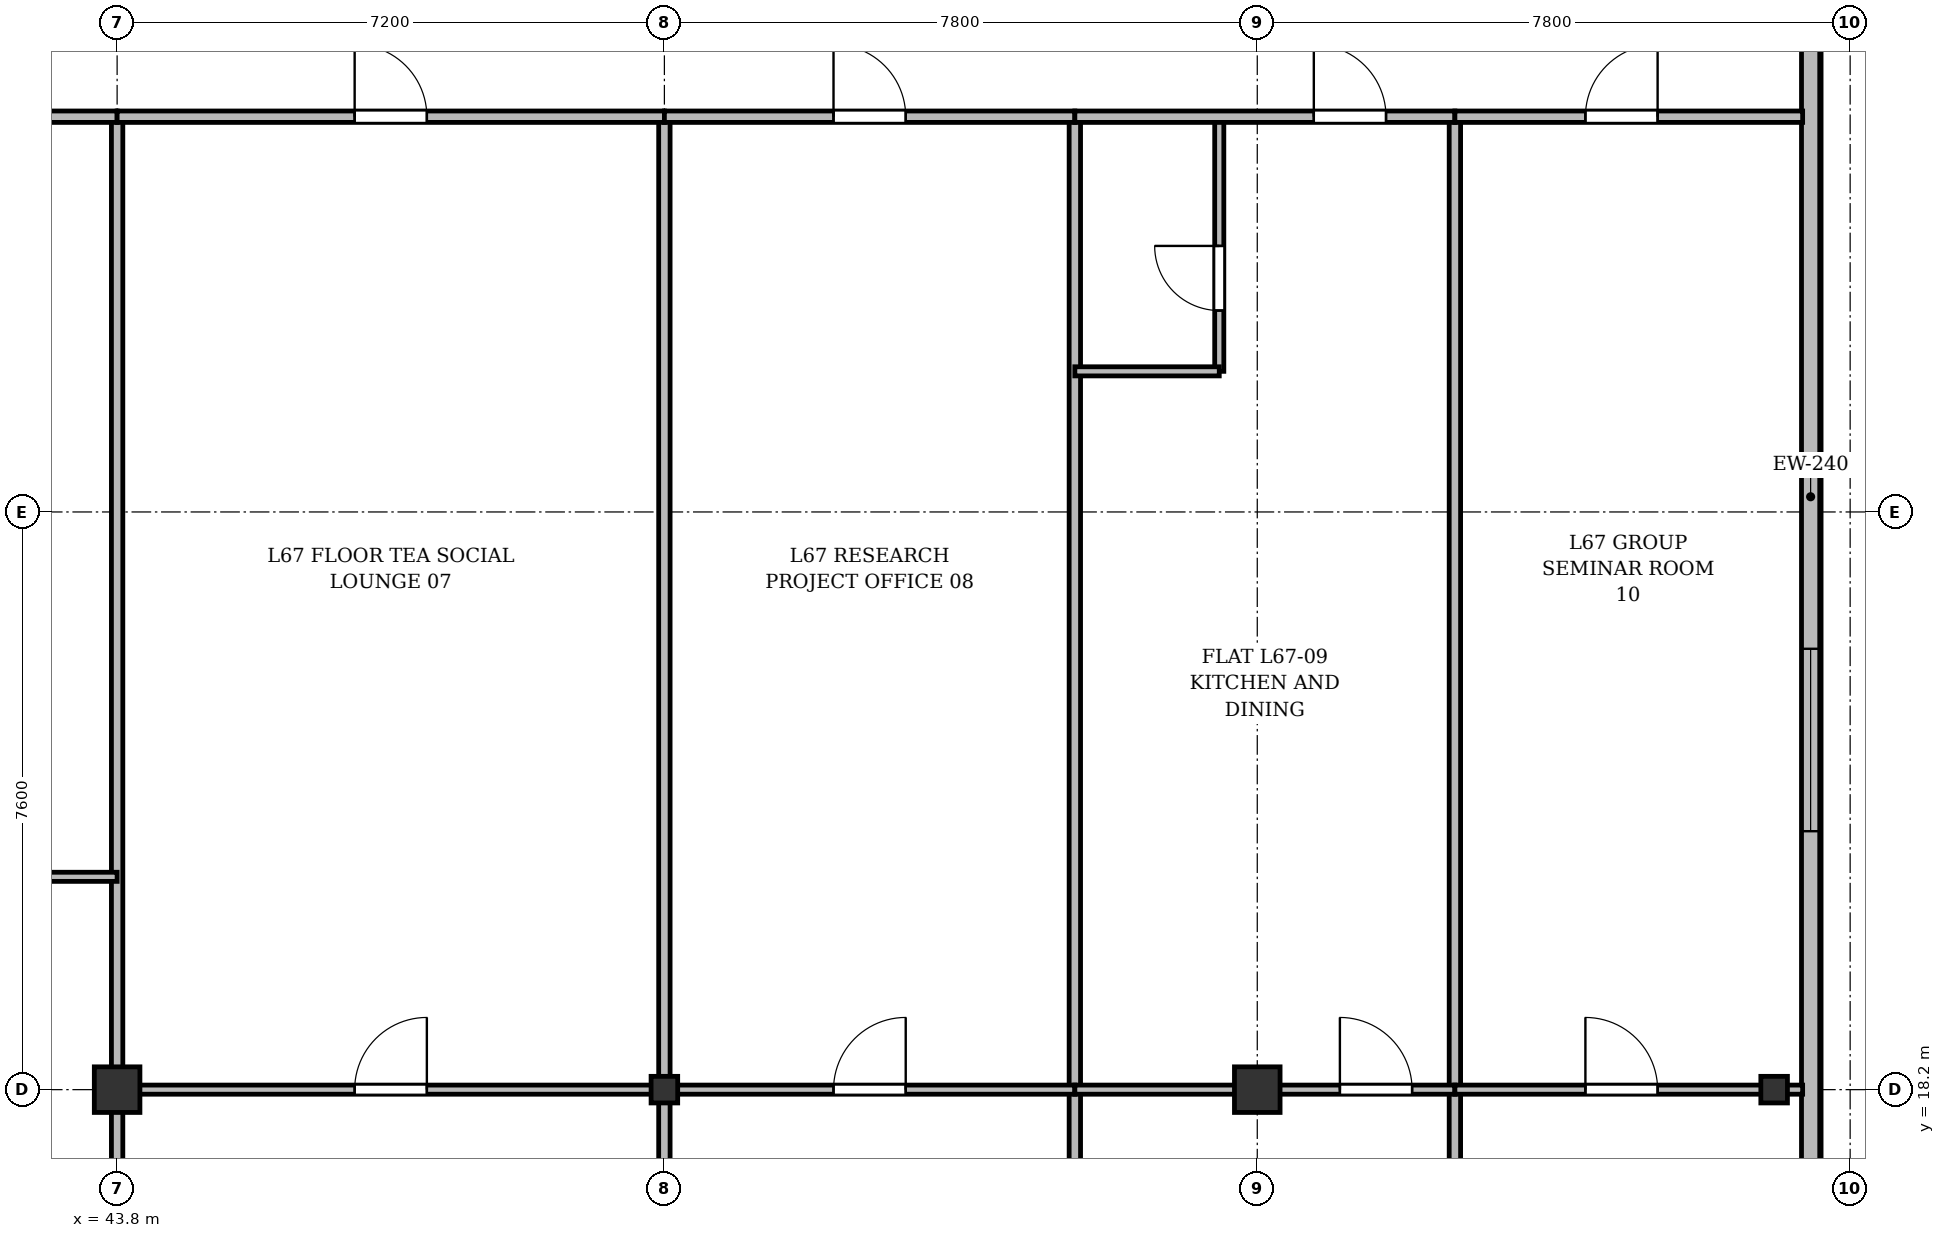
"""IFC4 building model, lengths in metres.
Left out: names, types, materials, properties, quantities, classifications, styles, units other than length and angle.
Written with IfcOpenShell. Run it as: python <this file> out.ifc"""

import sys

from ifc_helpers import new_model, si_unit, direction, frame, frame_2d, origin, origin_2d, place, context, subcontext, project, spatial, rectangle, i_section, extrude, source, transform, mapped, element, fill, save


model = new_model("IFC4")
c1 = context("Model", 3, precision=1e-05, world=origin(), true_north=direction((0.0, 1.0)))
c2 = subcontext(c1, "Body", "Model", "MODEL_VIEW")
j1 = project(units=[si_unit("LENGTHUNIT", "METRE"), si_unit("PLANEANGLEUNIT", "RADIAN")], contexts=[c1])
p1 = place(None, origin())
s1 = spatial("IfcSite", under=j1, at=p1, CompositionType="ELEMENT")
p2 = place(p1, origin())
s2 = spatial("IfcBuilding", under=s1, at=p2, CompositionType="ELEMENT")
p3 = place(p2, frame((0.0, 0.0, 259.5)))
s3 = spatial("IfcBuildingStorey", under=s2, at=p3, CompositionType="ELEMENT", Elevation=259.5)
m1 = source(origin(), c2, "Body", "SweptSolid", [
    extrude(rectangle(XDim=0.6, YDim=0.6, at=origin_2d()), origin(), (0.0, 0.0, 1.0), 3.6),
])
p4 = place(p3, frame((43.8, 18.2, 0.0), z_axis=(0.0, 0.0, 1.0), x_axis=(1.0, 0.0, 0.0)))
e1 = element("IfcColumn", 1, at=p4, inside=s3, PredefinedType="COLUMN", context=c2, shape_type="MappedRepresentation", body=[
    mapped(m1, transform((0.0, 0.0, 0.0), x_axis=(1.0, 0.0, 0.0), y_axis=(0.0, 1.0, 0.0), z_axis=(0.0, 0.0, 1.0), scale=1.0)),
])
m2 = source(origin(), c2, "Body", "SweptSolid", [
    extrude(i_section(OverallWidth=0.35, OverallDepth=0.35, WebThickness=0.018, FlangeThickness=0.028, at=origin_2d()), origin(), (0.0, 0.0, 1.0), 3.6),
])
p5 = place(p3, frame((51.0, 18.2, 0.0), z_axis=(0.0, 0.0, 1.0), x_axis=(1.0, 0.0, 0.0)))
e2 = element("IfcColumn", 2, at=p5, inside=s3, PredefinedType="COLUMN", context=c2, shape_type="MappedRepresentation", body=[
    mapped(m2, transform((0.0, 0.0, 0.0), x_axis=(1.0, 0.0, 0.0), y_axis=(0.0, 1.0, 0.0), z_axis=(0.0, 0.0, 1.0), scale=1.0)),
])
p6 = place(p3, frame((58.8, 18.2, 0.0), z_axis=(0.0, 0.0, 1.0), x_axis=(1.0, 0.0, 0.0)))
e3 = element("IfcColumn", 3, at=p6, inside=s3, PredefinedType="COLUMN", context=c2, shape_type="MappedRepresentation", body=[
    mapped(m1, transform((0.0, 0.0, 0.0), x_axis=(1.0, 0.0, 0.0), y_axis=(0.0, 1.0, 0.0), z_axis=(0.0, 0.0, 1.0), scale=1.0)),
])
p7 = place(p3, frame((65.6, 18.2, 0.0), z_axis=(0.0, 0.0, 1.0), x_axis=(1.0, 0.0, 0.0)))
e4 = element("IfcColumn", 4, at=p7, inside=s3, PredefinedType="COLUMN", context=c2, shape_type="MappedRepresentation", body=[
    mapped(m2, transform((0.0, 0.0, 0.0), x_axis=(1.0, 0.0, 0.0), y_axis=(0.0, 1.0, 0.0), z_axis=(0.0, 0.0, 1.0), scale=1.0)),
])
p8 = place(p3, frame((66.08, 45.5, 0.0), z_axis=(0.0, 0.0, 1.0), x_axis=(0.0, -1.0, 0.0)))
e5 = element("IfcWall", 5, at=p8, inside=s3, PredefinedType="SOLIDWALL", context=c2, shape_type="SweptSolid", body=[
    extrude(rectangle(XDim=39.0, YDim=0.24, at=frame_2d((19.5, 0.0))), origin(), (0.0, 0.0, 1.0), 3.37),
])
p9 = place(p8, frame((36.35, 0.0, 0.92)))
e6 = element("IfcOpeningElement", 6, at=p9, cuts=e5, PredefinedType="OPENING", context=c2, shape_type="SweptSolid", body=[
    extrude(rectangle(XDim=1.2, YDim=1.65, at=frame_2d((0.6, 0.825))), frame((0.0, 0.13, 0.0), z_axis=(0.0, -1.0, 0.0), x_axis=(1.0, 0.0, 0.0)), (0.0, 0.0, 1.0), 0.26),
])
p10 = place(p8, frame((32.9, 0.0, 0.92)))
e7 = element("IfcOpeningElement", 7, at=p10, cuts=e5, PredefinedType="OPENING", context=c2, shape_type="SweptSolid", body=[
    extrude(rectangle(XDim=2.4, YDim=2.1, at=frame_2d((1.2, 1.05))), frame((0.0, 0.13, 0.0), z_axis=(0.0, -1.0, 0.0), x_axis=(1.0, 0.0, 0.0)), (0.0, 0.0, 1.0), 0.26),
])
p11 = place(p8, frame((28.7, 0.0, 0.92)))
e8 = element("IfcOpeningElement", 8, at=p11, cuts=e5, PredefinedType="OPENING", context=c2, shape_type="SweptSolid", body=[
    extrude(rectangle(XDim=2.4, YDim=2.1, at=frame_2d((1.2, 1.05))), frame((0.0, 0.13, 0.0), z_axis=(0.0, -1.0, 0.0), x_axis=(1.0, 0.0, 0.0)), (0.0, 0.0, 1.0), 0.26),
])
p12 = place(p8, frame((21.5, 0.0, 0.92)))
e9 = element("IfcOpeningElement", 9, at=p12, cuts=e5, PredefinedType="OPENING", context=c2, shape_type="SweptSolid", body=[
    extrude(rectangle(XDim=2.4, YDim=2.1, at=frame_2d((1.2, 1.05))), frame((0.0, 0.13, 0.0), z_axis=(0.0, -1.0, 0.0), x_axis=(1.0, 0.0, 0.0)), (0.0, 0.0, 1.0), 0.26),
])
p13 = place(p8, frame((7.5, 0.0, 0.92)))
e10 = element("IfcOpeningElement", 10, at=p13, cuts=e5, PredefinedType="OPENING", context=c2, shape_type="SweptSolid", body=[
    extrude(rectangle(XDim=2.4, YDim=2.1, at=frame_2d((1.2, 1.05))), frame((0.0, 0.13, 0.0), z_axis=(0.0, -1.0, 0.0), x_axis=(1.0, 0.0, 0.0)), (0.0, 0.0, 1.0), 0.26),
])
p14 = place(p8, frame((4.5, 0.0, 0.92)))
e11 = element("IfcOpeningElement", 11, at=p14, cuts=e5, PredefinedType="OPENING", context=c2, shape_type="SweptSolid", body=[
    extrude(rectangle(XDim=1.2, YDim=1.65, at=frame_2d((0.6, 0.825))), frame((0.0, 0.13, 0.0), z_axis=(0.0, -1.0, 0.0), x_axis=(1.0, 0.0, 0.0)), (0.0, 0.0, 1.0), 0.26),
])
p15 = place(p8, frame((1.15, 0.0, 0.92)))
e12 = element("IfcOpeningElement", 12, at=p15, cuts=e5, PredefinedType="OPENING", context=c2, shape_type="SweptSolid", body=[
    extrude(rectangle(XDim=1.2, YDim=1.65, at=frame_2d((0.6, 0.825))), frame((0.0, 0.13, 0.0), z_axis=(0.0, -1.0, 0.0), x_axis=(1.0, 0.0, 0.0)), (0.0, 0.0, 1.0), 0.26),
])
for number, where, z_axis, x_axis in (
    (13, (43.8, 3.725, 0.0), (0.0, 0.0, 1.0), (0.0, 1.0, 0.0)),
    (14, (51.0, 3.725, 0.0), (0.0, 0.0, 1.0), (0.0, 1.0, 0.0)),
):
    element("IfcWall", number, at=place(p3, frame(where, z_axis=z_axis, x_axis=x_axis)), inside=s3, PredefinedType="PARTITIONING", context=c2, shape_type="SweptSolid", body=[
        extrude(rectangle(XDim=27.275, YDim=0.15, at=frame_2d((13.637, 0.0))), origin(), (0.0, 0.0, 1.0), 2.87),
    ])
for number, where, z_axis, x_axis in (
    (15, (56.4, 3.725, 0.0), (0.0, 0.0, 1.0), (0.0, 1.0, 0.0)),
    (16, (61.4, 3.725, 0.0), (0.0, 0.0, 1.0), (0.0, 1.0, 0.0)),
):
    element("IfcWall", number, at=place(p3, frame(where, z_axis=z_axis, x_axis=x_axis)), inside=s3, PredefinedType="PARTITIONING", context=c2, shape_type="SweptSolid", body=[
        extrude(rectangle(XDim=27.275, YDim=0.15, at=frame_2d((13.637, 0.0))), origin(), (0.0, 0.0, 1.0), 2.92),
    ])
p16 = place(p3, frame((36.4, 21.0, 0.0), z_axis=(0.0, 0.0, 1.0), x_axis=(1.0, 0.0, 0.0)))
e17 = element("IfcWall", 17, at=p16, inside=s3, PredefinedType="PARTITIONING", context=c2, shape_type="SweptSolid", body=[
    extrude(rectangle(XDim=7.4, YDim=0.12, at=frame_2d((3.7, 0.0))), origin(), (0.0, 0.0, 1.0), 2.87),
])
p17 = place(p16, frame((3.133, 0.0, 0.0)))
e18 = element("IfcOpeningElement", 18, at=p17, cuts=e17, PredefinedType="OPENING", context=c2, shape_type="SweptSolid", body=[
    extrude(rectangle(XDim=0.95, YDim=2.15, at=frame_2d((0.475, 1.075))), frame((0.0, 0.07, 0.0), z_axis=(0.0, -1.0, 0.0), x_axis=(1.0, 0.0, 0.0)), (0.0, 0.0, 1.0), 0.14),
])
p18 = place(p3, frame((36.4, 31.0, 0.0), z_axis=(0.0, 0.0, 1.0), x_axis=(1.0, 0.0, 0.0)))
e19 = element("IfcWall", 19, at=p18, inside=s3, PredefinedType="PARTITIONING", context=c2, shape_type="SweptSolid", body=[
    extrude(rectangle(XDim=7.4, YDim=0.15, at=frame_2d((3.7, 0.0))), origin(), (0.0, 0.0, 1.0), 2.87),
])
p19 = place(p18, frame((4.967, 0.0, 0.0)))
e20 = element("IfcOpeningElement", 20, at=p19, cuts=e19, PredefinedType="OPENING", context=c2, shape_type="SweptSolid", body=[
    extrude(rectangle(XDim=0.95, YDim=2.15, at=frame_2d((0.475, 1.075))), frame((0.0, 0.085, 0.0), z_axis=(0.0, -1.0, 0.0), x_axis=(1.0, 0.0, 0.0)), (0.0, 0.0, 1.0), 0.17),
])
p20 = place(p3, frame((43.8, 31.0, 0.0), z_axis=(0.0, 0.0, 1.0), x_axis=(1.0, 0.0, 0.0)))
e21 = element("IfcWall", 21, at=p20, inside=s3, PredefinedType="PARTITIONING", context=c2, shape_type="SweptSolid", body=[
    extrude(rectangle(XDim=7.2, YDim=0.15, at=frame_2d((3.6, 0.0))), origin(), (0.0, 0.0, 1.0), 2.87),
])
p21 = place(p20, frame((3.125, 0.0, 0.0)))
e22 = element("IfcOpeningElement", 22, at=p21, cuts=e21, PredefinedType="OPENING", context=c2, shape_type="SweptSolid", body=[
    extrude(rectangle(XDim=0.95, YDim=2.15, at=frame_2d((0.475, 1.075))), frame((0.0, 0.085, 0.0), z_axis=(0.0, -1.0, 0.0), x_axis=(1.0, 0.0, 0.0)), (0.0, 0.0, 1.0), 0.17),
])
p22 = place(p3, frame((43.8, 18.2, 0.0), z_axis=(0.0, 0.0, 1.0), x_axis=(1.0, 0.0, 0.0)))
e23 = element("IfcWall", 23, at=p22, inside=s3, PredefinedType="PARTITIONING", context=c2, shape_type="SweptSolid", body=[
    extrude(rectangle(XDim=7.2, YDim=0.12, at=frame_2d((3.6, 0.0))), origin(), (0.0, 0.0, 1.0), 2.92),
])
p23 = place(p22, frame((3.125, 0.0, 0.0)))
e24 = element("IfcOpeningElement", 24, at=p23, cuts=e23, PredefinedType="OPENING", context=c2, shape_type="SweptSolid", body=[
    extrude(rectangle(XDim=0.95, YDim=2.15, at=frame_2d((0.475, 1.075))), frame((0.0, 0.07, 0.0), z_axis=(0.0, -1.0, 0.0), x_axis=(1.0, 0.0, 0.0)), (0.0, 0.0, 1.0), 0.14),
])
p24 = place(p3, frame((51.0, 31.0, 0.0), z_axis=(0.0, 0.0, 1.0), x_axis=(1.0, 0.0, 0.0)))
e25 = element("IfcWall", 25, at=p24, inside=s3, PredefinedType="PARTITIONING", context=c2, shape_type="SweptSolid", body=[
    extrude(rectangle(XDim=5.4, YDim=0.15, at=frame_2d((2.7, 0.0))), origin(), (0.0, 0.0, 1.0), 2.87),
])
p25 = place(p24, frame((2.225, 0.0, 0.0)))
e26 = element("IfcOpeningElement", 26, at=p25, cuts=e25, PredefinedType="OPENING", context=c2, shape_type="SweptSolid", body=[
    extrude(rectangle(XDim=0.95, YDim=2.15, at=frame_2d((0.475, 1.075))), frame((0.0, 0.085, 0.0), z_axis=(0.0, -1.0, 0.0), x_axis=(1.0, 0.0, 0.0)), (0.0, 0.0, 1.0), 0.17),
])
p26 = place(p3, frame((51.0, 18.2, 0.0), z_axis=(0.0, 0.0, 1.0), x_axis=(1.0, 0.0, 0.0)))
e27 = element("IfcWall", 27, at=p26, inside=s3, PredefinedType="PARTITIONING", context=c2, shape_type="SweptSolid", body=[
    extrude(rectangle(XDim=5.4, YDim=0.12, at=frame_2d((2.7, 0.0))), origin(), (0.0, 0.0, 1.0), 2.92),
])
p27 = place(p26, frame((2.225, 0.0, 0.0)))
e28 = element("IfcOpeningElement", 28, at=p27, cuts=e27, PredefinedType="OPENING", context=c2, shape_type="SweptSolid", body=[
    extrude(rectangle(XDim=0.95, YDim=2.15, at=frame_2d((0.475, 1.075))), frame((0.0, 0.07, 0.0), z_axis=(0.0, -1.0, 0.0), x_axis=(1.0, 0.0, 0.0)), (0.0, 0.0, 1.0), 0.14),
])
p28 = place(p3, frame((56.4, 18.2, 0.0), z_axis=(0.0, 0.0, 1.0), x_axis=(1.0, 0.0, 0.0)))
e29 = element("IfcWall", 29, at=p28, inside=s3, PredefinedType="PARTITIONING", context=c2, shape_type="SweptSolid", body=[
    extrude(rectangle(XDim=5.0, YDim=0.12, at=frame_2d((2.5, 0.0))), origin(), (0.0, 0.0, 1.0), 2.92),
])
p29 = place(p28, frame((3.487, 0.0, 0.0)))
e30 = element("IfcOpeningElement", 30, at=p29, cuts=e29, PredefinedType="OPENING", context=c2, shape_type="SweptSolid", body=[
    extrude(rectangle(XDim=0.95, YDim=2.15, at=frame_2d((0.475, 1.075))), frame((0.0, 0.07, 0.0), z_axis=(0.0, -1.0, 0.0), x_axis=(1.0, 0.0, 0.0)), (0.0, 0.0, 1.0), 0.14),
])
p30 = place(p3, frame((58.3, 27.65, 0.0), z_axis=(0.0, 0.0, 1.0), x_axis=(0.0, 1.0, 0.0)))
e31 = element("IfcWall", 31, at=p30, inside=s3, PredefinedType="PARTITIONING", context=c2, shape_type="SweptSolid", body=[
    extrude(rectangle(XDim=3.35, YDim=0.12, at=frame_2d((1.675, 0.0))), origin(), (0.0, 0.0, 1.0), 3.37),
])
p31 = place(p30, frame((0.8, 0.0, 0.0)))
e32 = element("IfcOpeningElement", 32, at=p31, cuts=e31, PredefinedType="OPENING", context=c2, shape_type="SweptSolid", body=[
    extrude(rectangle(XDim=0.85, YDim=2.1, at=frame_2d((0.425, 1.05))), frame((0.0, 0.07, 0.0), z_axis=(0.0, -1.0, 0.0), x_axis=(1.0, 0.0, 0.0)), (0.0, 0.0, 1.0), 0.14),
])
p32 = place(p3, frame((56.4, 27.65, 0.0), z_axis=(0.0, 0.0, 1.0), x_axis=(1.0, 0.0, 0.0)))
e33 = element("IfcWall", 33, at=p32, inside=s3, PredefinedType="PARTITIONING", context=c2, shape_type="SweptSolid", body=[
    extrude(rectangle(XDim=1.9, YDim=0.12, at=frame_2d((0.95, 0.0))), origin(), (0.0, 0.0, 1.0), 3.37),
])
p33 = place(p3, frame((56.4, 31.0, 0.0), z_axis=(0.0, 0.0, 1.0), x_axis=(1.0, 0.0, 0.0)))
e34 = element("IfcWall", 34, at=p33, inside=s3, PredefinedType="PARTITIONING", context=c2, shape_type="SweptSolid", body=[
    extrude(rectangle(XDim=5.0, YDim=0.15, at=frame_2d((2.5, 0.0))), origin(), (0.0, 0.0, 1.0), 2.87),
])
p34 = place(p33, frame((3.144, 0.0, 0.0)))
e35 = element("IfcOpeningElement", 35, at=p34, cuts=e34, PredefinedType="OPENING", context=c2, shape_type="SweptSolid", body=[
    extrude(rectangle(XDim=0.95, YDim=2.15, at=frame_2d((0.475, 1.075))), frame((0.0, 0.085, 0.0), z_axis=(0.0, -1.0, 0.0), x_axis=(1.0, 0.0, 0.0)), (0.0, 0.0, 1.0), 0.17),
])
p35 = place(p3, frame((61.4, 31.0, 0.0), z_axis=(0.0, 0.0, 1.0), x_axis=(1.0, 0.0, 0.0)))
e36 = element("IfcWall", 36, at=p35, inside=s3, PredefinedType="PARTITIONING", context=c2, shape_type="SweptSolid", body=[
    extrude(rectangle(XDim=4.575, YDim=0.15, at=frame_2d((2.288, 0.0))), origin(), (0.0, 0.0, 1.0), 2.87),
])
p36 = place(p35, frame((1.717, 0.0, 0.0)))
e37 = element("IfcOpeningElement", 37, at=p36, cuts=e36, PredefinedType="OPENING", context=c2, shape_type="SweptSolid", body=[
    extrude(rectangle(XDim=0.95, YDim=2.15, at=frame_2d((0.475, 1.075))), frame((0.0, 0.085, 0.0), z_axis=(0.0, -1.0, 0.0), x_axis=(1.0, 0.0, 0.0)), (0.0, 0.0, 1.0), 0.17),
])
p37 = place(p3, frame((61.4, 18.2, 0.0), z_axis=(0.0, 0.0, 1.0), x_axis=(1.0, 0.0, 0.0)))
e38 = element("IfcWall", 38, at=p37, inside=s3, PredefinedType="PARTITIONING", context=c2, shape_type="SweptSolid", body=[
    extrude(rectangle(XDim=4.575, YDim=0.12, at=frame_2d((2.288, 0.0))), origin(), (0.0, 0.0, 1.0), 2.92),
])
p38 = place(p37, frame((1.717, 0.0, 0.0)))
e39 = element("IfcOpeningElement", 39, at=p38, cuts=e38, PredefinedType="OPENING", context=c2, shape_type="SweptSolid", body=[
    extrude(rectangle(XDim=0.95, YDim=2.15, at=frame_2d((0.475, 1.075))), frame((0.0, 0.07, 0.0), z_axis=(0.0, -1.0, 0.0), x_axis=(1.0, 0.0, 0.0)), (0.0, 0.0, 1.0), 0.14),
])
m3 = source(origin(), c2, "Body", "SweptSolid", [
    extrude(rectangle(XDim=2.4, YDim=2.1, at=frame_2d((1.2, 1.05))), frame((0.0, 0.03, 0.0), z_axis=(0.0, -1.0, 0.0), x_axis=(1.0, 0.0, 0.0)), (0.0, 0.0, 1.0), 0.06),
])
p39 = place(p12, origin())
e40 = element("IfcWindow", 40, at=p39, inside=s3, PartitioningType="SINGLE_PANEL", PredefinedType="WINDOW", context=c2, shape_type="MappedRepresentation", body=[
    mapped(m3, transform((0.0, 0.0, 0.0), x_axis=(1.0, 0.0, 0.0), y_axis=(0.0, 1.0, 0.0), z_axis=(0.0, 0.0, 1.0), scale=1.0)),
])
fill(e9, e40)
m4 = source(origin(), c2, "Body", "SweptSolid", [
    extrude(rectangle(XDim=0.95, YDim=2.15, at=frame_2d((0.475, 1.075))), frame((0.0, 0.025, 0.0), z_axis=(0.0, -1.0, 0.0), x_axis=(1.0, 0.0, 0.0)), (0.0, 0.0, 1.0), 0.05),
])
p40 = place(p21, origin())
e41 = element("IfcDoor", 41, at=p40, inside=s3, OperationType="SINGLE_SWING_LEFT", PredefinedType="DOOR", context=c2, shape_type="MappedRepresentation", body=[
    mapped(m4, transform((0.0, 0.0, 0.0), x_axis=(1.0, 0.0, 0.0), y_axis=(0.0, 1.0, 0.0), z_axis=(0.0, 0.0, 1.0), scale=1.0)),
])
fill(e22, e41)
p41 = place(p23, origin())
e42 = element("IfcDoor", 42, at=p41, inside=s3, OperationType="SINGLE_SWING_RIGHT", PredefinedType="DOOR", context=c2, shape_type="MappedRepresentation", body=[
    mapped(m4, transform((0.0, 0.0, 0.0), x_axis=(1.0, 0.0, 0.0), y_axis=(0.0, 1.0, 0.0), z_axis=(0.0, 0.0, 1.0), scale=1.0)),
])
fill(e24, e42)
p42 = place(p25, origin())
e43 = element("IfcDoor", 43, at=p42, inside=s3, OperationType="SINGLE_SWING_LEFT", PredefinedType="DOOR", context=c2, shape_type="MappedRepresentation", body=[
    mapped(m4, transform((0.0, 0.0, 0.0), x_axis=(1.0, 0.0, 0.0), y_axis=(0.0, 1.0, 0.0), z_axis=(0.0, 0.0, 1.0), scale=1.0)),
])
fill(e26, e43)
p43 = place(p27, origin())
e44 = element("IfcDoor", 44, at=p43, inside=s3, OperationType="SINGLE_SWING_RIGHT", PredefinedType="DOOR", context=c2, shape_type="MappedRepresentation", body=[
    mapped(m4, transform((0.0, 0.0, 0.0), x_axis=(1.0, 0.0, 0.0), y_axis=(0.0, 1.0, 0.0), z_axis=(0.0, 0.0, 1.0), scale=1.0)),
])
fill(e28, e44)
p44 = place(p29, origin())
e45 = element("IfcDoor", 45, at=p44, inside=s3, OperationType="SINGLE_SWING_LEFT", PredefinedType="DOOR", context=c2, shape_type="MappedRepresentation", body=[
    mapped(m4, transform((0.0, 0.0, 0.0), x_axis=(1.0, 0.0, 0.0), y_axis=(0.0, 1.0, 0.0), z_axis=(0.0, 0.0, 1.0), scale=1.0)),
])
fill(e30, e45)
m5 = source(origin(), c2, "Body", "SweptSolid", [
    extrude(rectangle(XDim=0.85, YDim=2.1, at=frame_2d((0.425, 1.05))), frame((0.0, 0.025, 0.0), z_axis=(0.0, -1.0, 0.0), x_axis=(1.0, 0.0, 0.0)), (0.0, 0.0, 1.0), 0.05),
])
p45 = place(p31, origin())
e46 = element("IfcDoor", 46, at=p45, inside=s3, OperationType="SINGLE_SWING_RIGHT", PredefinedType="DOOR", context=c2, shape_type="MappedRepresentation", body=[
    mapped(m5, transform((0.0, 0.0, 0.0), x_axis=(1.0, 0.0, 0.0), y_axis=(0.0, 1.0, 0.0), z_axis=(0.0, 0.0, 1.0), scale=1.0)),
])
fill(e32, e46)
p46 = place(p34, origin())
e47 = element("IfcDoor", 47, at=p46, inside=s3, OperationType="SINGLE_SWING_LEFT", PredefinedType="DOOR", context=c2, shape_type="MappedRepresentation", body=[
    mapped(m4, transform((0.0, 0.0, 0.0), x_axis=(1.0, 0.0, 0.0), y_axis=(0.0, 1.0, 0.0), z_axis=(0.0, 0.0, 1.0), scale=1.0)),
])
fill(e35, e47)
p47 = place(p36, origin())
e48 = element("IfcDoor", 48, at=p47, inside=s3, OperationType="SINGLE_SWING_RIGHT", PredefinedType="DOOR", context=c2, shape_type="MappedRepresentation", body=[
    mapped(m4, transform((0.0, 0.0, 0.0), x_axis=(1.0, 0.0, 0.0), y_axis=(0.0, 1.0, 0.0), z_axis=(0.0, 0.0, 1.0), scale=1.0)),
])
fill(e37, e48)
p48 = place(p38, origin())
e49 = element("IfcDoor", 49, at=p48, inside=s3, OperationType="SINGLE_SWING_LEFT", PredefinedType="DOOR", context=c2, shape_type="MappedRepresentation", body=[
    mapped(m4, transform((0.0, 0.0, 0.0), x_axis=(1.0, 0.0, 0.0), y_axis=(0.0, 1.0, 0.0), z_axis=(0.0, 0.0, 1.0), scale=1.0)),
])
fill(e39, e49)
save(model, sys.argv[1])
